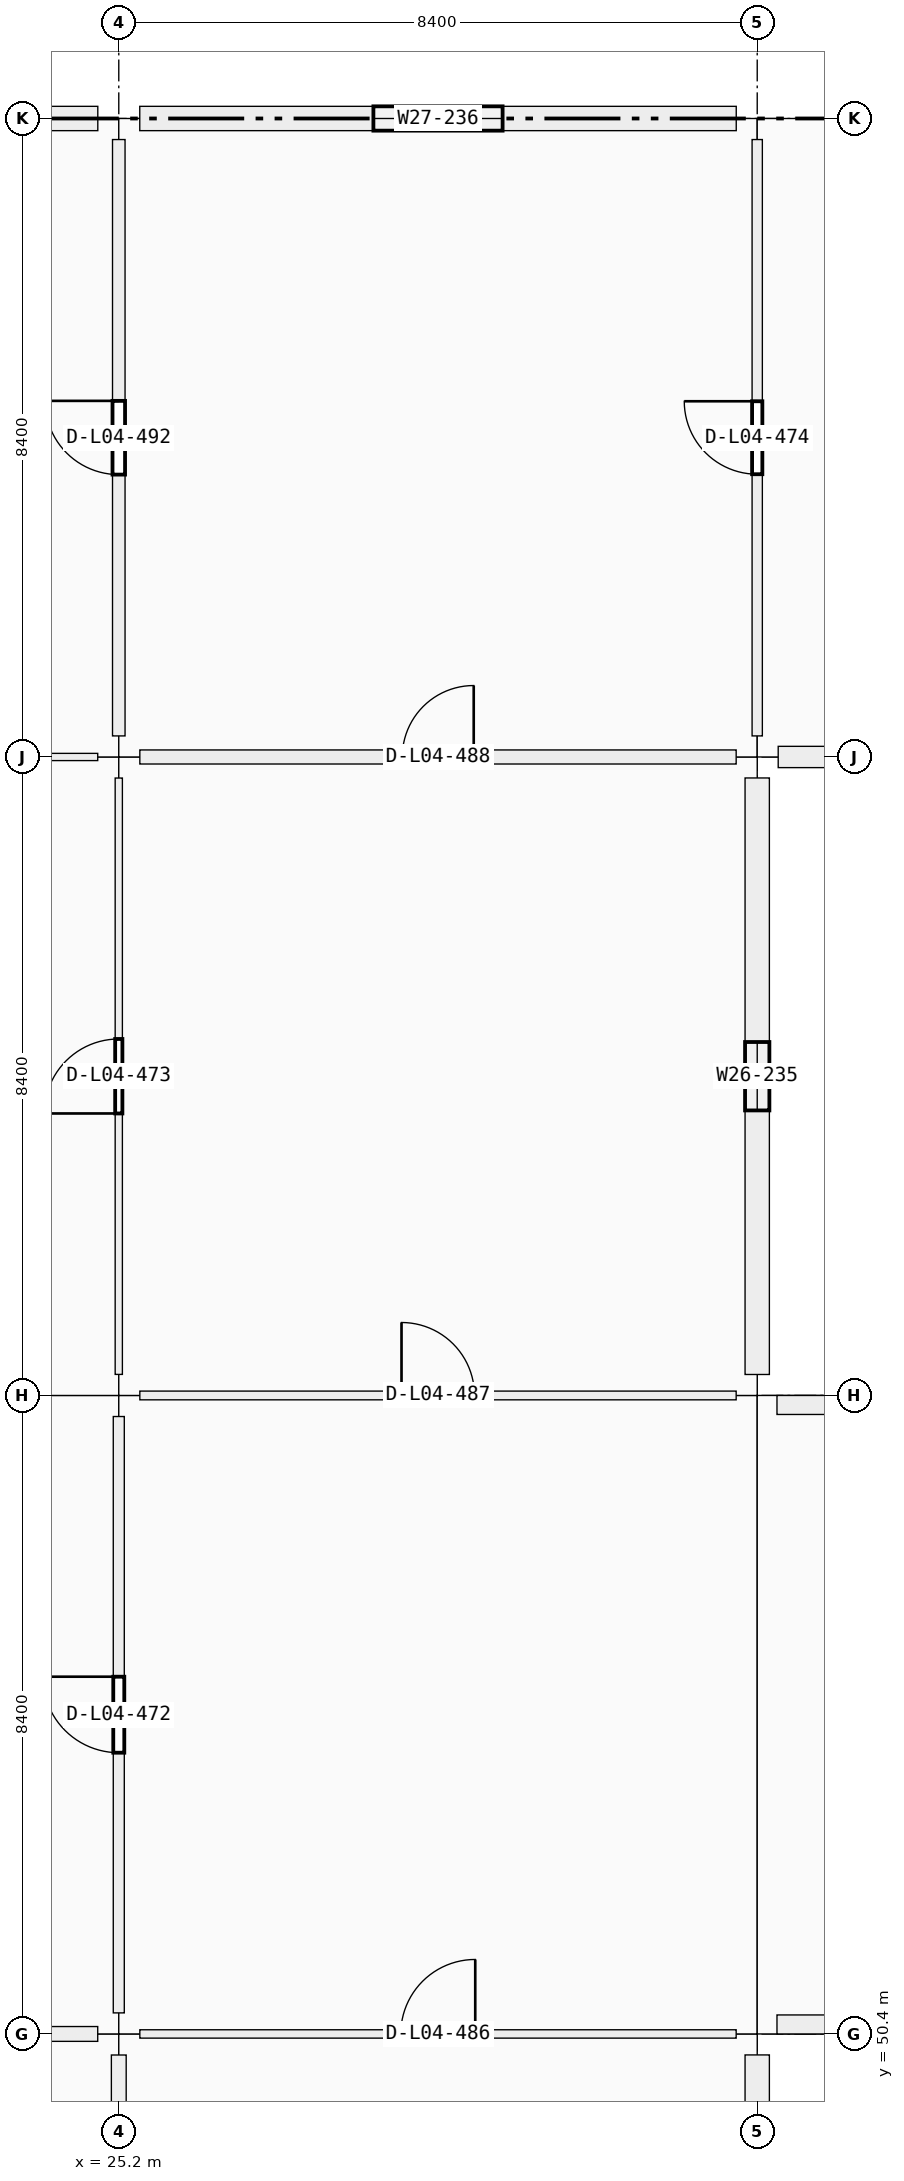
"""IFC4 building model, lengths in metres.
Left out: names, types, materials, properties, quantities, classifications, styles, units other than length and angle.
Written with IfcOpenShell. Run it as: python <this file> out.ifc"""

import sys

from ifc_helpers import new_model, si_unit, direction, frame, frame_2d, origin, origin_2d, place, context, subcontext, project, spatial, rectangle, i_section, extrude, element, fill, save


model = new_model("IFC4")
c1 = context("Model", 3, precision=1e-05, world=origin(), true_north=direction((0.0, 1.0)))
c2 = subcontext(c1, "Body", "Model", "MODEL_VIEW")
j1 = project(units=[si_unit("LENGTHUNIT", "METRE"), si_unit("PLANEANGLEUNIT", "RADIAN")], contexts=[c1])
p1 = place(None, origin())
s1 = spatial("IfcSite", under=j1, at=p1, CompositionType="ELEMENT")
p2 = place(p1, origin())
s2 = spatial("IfcBuilding", under=s1, at=p2, CompositionType="ELEMENT")
p3 = place(p2, frame((0.0, 0.0, 19.08)))
s3 = spatial("IfcBuildingStorey", under=s2, at=p3, CompositionType="ELEMENT", Elevation=19.08)
for number, where, z_axis, x_axis in (
    (1, (25.2, 50.4, 0.0), (0.0, 0.0, 1.0), (1.0, 0.0, 0.0)),
    (2, (25.2, 58.8, 0.0), (0.0, 0.0, 1.0), (1.0, 0.0, 0.0)),
    (3, (25.2, 67.2, 0.0), (0.0, 0.0, 1.0), (1.0, 0.0, 0.0)),
    (4, (25.2, 75.6, 0.0), (0.0, 0.0, 1.0), (1.0, 0.0, 0.0)),
    (5, (33.6, 50.4, 0.0), (0.0, 0.0, 1.0), (1.0, 0.0, 0.0)),
    (6, (33.6, 58.8, 0.0), (0.0, 0.0, 1.0), (1.0, 0.0, 0.0)),
    (7, (33.6, 67.2, 0.0), (0.0, 0.0, 1.0), (1.0, 0.0, 0.0)),
    (8, (33.6, 75.6, 0.0), (0.0, 0.0, 1.0), (1.0, 0.0, 0.0)),
):
    element("IfcColumn", number, at=place(p3, frame(where, z_axis=z_axis, x_axis=x_axis)), inside=s3, PredefinedType="COLUMN", context=c2, shape_type="SweptSolid", body=[
        extrude(rectangle(XDim=0.55, YDim=0.55, at=origin_2d()), origin(), (0.0, 0.0, 1.0), 4.16),
    ])
for number, where, z_axis, x_axis in (
    (9, (25.2, 50.4, 4.16), (0.0, 0.0, 1.0), (1.0, 0.0, 0.0)),
    (10, (25.2, 58.8, 4.16), (0.0, 0.0, 1.0), (1.0, 0.0, 0.0)),
    (11, (25.2, 67.2, 4.16), (0.0, 0.0, 1.0), (1.0, 0.0, 0.0)),
    (12, (25.2, 75.6, 4.16), (0.0, 0.0, 1.0), (1.0, 0.0, 0.0)),
):
    element("IfcColumn", number, at=place(p3, frame(where, z_axis=z_axis, x_axis=x_axis)), inside=s3, PredefinedType="COLUMN", context=c2, shape_type="SweptSolid", body=[
        extrude(i_section(OverallWidth=0.305, OverallDepth=0.308, WebThickness=0.01, FlangeThickness=0.015, FilletRadius=0.017, at=origin_2d()), origin(), (0.0, 0.0, 1.0), 1.925),
    ])
p4 = place(p3, frame((17.076, 75.6, 0.0), z_axis=(0.0, 0.0, 1.0), x_axis=(1.0, 0.0, 0.0)))
e13 = element("IfcWall", 13, at=p4, inside=s3, PredefinedType="SOLIDWALL", context=c2, shape_type="SweptSolid", body=[
    extrude(rectangle(XDim=7.848, YDim=0.32, at=frame_2d((3.924, 0.0))), origin(), (0.0, 0.0, 1.0), 3.37),
])
p5 = place(p3, frame((33.6, 50.124, 0.0), z_axis=(0.0, 0.0, 1.0), x_axis=(0.0, -1.0, 0.0)))
e14 = element("IfcWall", 14, at=p5, inside=s3, PredefinedType="SOLIDWALL", context=c2, shape_type="SweptSolid", body=[
    extrude(rectangle(XDim=7.848, YDim=0.32, at=frame_2d((3.924, 0.0))), origin(), (0.0, 0.0, 1.0), 3.37),
])
p6 = place(p5, frame((3.174, 0.0, 0.9)))
e15 = element("IfcOpeningElement", 15, at=p6, cuts=e14, PredefinedType="OPENING", context=c2, shape_type="SweptSolid", body=[
    extrude(rectangle(XDim=1.5, YDim=1.2, at=frame_2d((0.75, 0.6))), frame((0.0, 0.16, 0.0), z_axis=(0.0, -1.0, 0.0), x_axis=(1.0, 0.0, 0.0)), (0.0, 0.0, 1.0), 0.32),
])
p7 = place(p3, frame((33.6, 66.924, 0.0), z_axis=(0.0, 0.0, 1.0), x_axis=(0.0, -1.0, 0.0)))
e16 = element("IfcWall", 16, at=p7, inside=s3, PredefinedType="SOLIDWALL", context=c2, shape_type="SweptSolid", body=[
    extrude(rectangle(XDim=7.848, YDim=0.32, at=frame_2d((3.924, 0.0))), origin(), (0.0, 0.0, 1.0), 3.37),
])
p8 = place(p7, frame((3.474, 0.0, 0.9)))
e17 = element("IfcOpeningElement", 17, at=p8, cuts=e16, PredefinedType="OPENING", context=c2, shape_type="SweptSolid", body=[
    extrude(rectangle(XDim=0.9, YDim=1.5, at=frame_2d((0.45, 0.75))), frame((0.0, 0.16, 0.0), z_axis=(0.0, -1.0, 0.0), x_axis=(1.0, 0.0, 0.0)), (0.0, 0.0, 1.0), 0.32),
])
p9 = place(p3, frame((25.476, 75.6, 0.0), z_axis=(0.0, 0.0, 1.0), x_axis=(1.0, 0.0, 0.0)))
e18 = element("IfcWall", 18, at=p9, inside=s3, PredefinedType="SOLIDWALL", context=c2, shape_type="SweptSolid", body=[
    extrude(rectangle(XDim=7.848, YDim=0.32, at=frame_2d((3.924, 0.0))), origin(), (0.0, 0.0, 1.0), 3.37),
])
p10 = place(p9, frame((3.074, 0.0, 0.9)))
e19 = element("IfcOpeningElement", 19, at=p10, cuts=e18, PredefinedType="OPENING", context=c2, shape_type="SweptSolid", body=[
    extrude(rectangle(XDim=1.7, YDim=1.85, at=frame_2d((0.85, 0.925))), frame((0.0, 0.16, 0.0), z_axis=(0.0, -1.0, 0.0), x_axis=(1.0, 0.0, 0.0)), (0.0, 0.0, 1.0), 0.32),
])
p11 = place(p3, frame((41.724, 67.2, 0.0), z_axis=(0.0, 0.0, 1.0), x_axis=(-1.0, 0.0, 0.0)))
e20 = element("IfcWall", 20, at=p11, inside=s3, PredefinedType="SOLIDWALL", context=c2, shape_type="SweptSolid", body=[
    extrude(rectangle(XDim=7.848, YDim=0.28, at=frame_2d((3.924, 0.0))), origin(), (0.0, 0.0, 1.0), 3.37),
])
p12 = place(p11, frame((2.774, 0.0, 0.9)))
e21 = element("IfcOpeningElement", 21, at=p12, cuts=e20, PredefinedType="OPENING", context=c2, shape_type="SweptSolid", body=[
    extrude(rectangle(XDim=2.3, YDim=1.85, at=frame_2d((1.15, 0.925))), frame((0.0, 0.14, 0.0), z_axis=(0.0, -1.0, 0.0), x_axis=(1.0, 0.0, 0.0)), (0.0, 0.0, 1.0), 0.28),
])
for number, where, z_axis, x_axis in (
    (22, (41.74, 50.525, 0.0), (0.0, 0.0, 1.0), (-1.0, 0.0, 0.0)),
    (23, (33.86, 58.675, 0.0), (0.0, 0.0, 1.0), (1.0, 0.0, 0.0)),
):
    element("IfcWall", number, at=place(p3, frame(where, z_axis=z_axis, x_axis=x_axis)), inside=s3, PredefinedType="PARAPET", context=c2, shape_type="SweptSolid", body=[
        extrude(rectangle(XDim=7.88, YDim=0.25, at=frame_2d((3.94, 0.0))), origin(), (0.0, 0.0, 1.0), 0.95),
    ])
p13 = place(p3, frame((17.077, 50.4, 0.0), z_axis=(0.0, 0.0, 1.0), x_axis=(1.0, 0.0, 0.0)))
e24 = element("IfcWall", 24, at=p13, inside=s3, PredefinedType="PARTITIONING", context=c2, shape_type="SweptSolid", body=[
    extrude(rectangle(XDim=7.846, YDim=0.195, at=frame_2d((3.923, 0.0))), origin(), (0.0, 0.0, 1.0), 3.19),
])
p14 = place(p13, frame((0.718, 0.0, 0.0)))
e25 = element("IfcOpeningElement", 25, at=p14, cuts=e24, PredefinedType="OPENING", context=c2, shape_type="SweptSolid", body=[
    extrude(rectangle(XDim=0.94, YDim=2.08, at=frame_2d((0.47, 1.04))), frame((0.0, 0.098, 0.0), z_axis=(0.0, -1.0, 0.0), x_axis=(1.0, 0.0, 0.0)), (0.0, 0.0, 1.0), 0.195),
])
p15 = place(p13, frame((4.628, 0.0, 0.0)))
e26 = element("IfcOpeningElement", 26, at=p15, cuts=e24, PredefinedType="OPENING", context=c2, shape_type="SweptSolid", body=[
    extrude(rectangle(XDim=0.96, YDim=2.1, at=frame_2d((0.48, 1.05))), frame((0.0, 0.098, 0.0), z_axis=(0.0, -1.0, 0.0), x_axis=(1.0, 0.0, 0.0)), (0.0, 0.0, 1.0), 0.195),
])
p16 = place(p3, frame((17.077, 67.2, 0.0), z_axis=(0.0, 0.0, 1.0), x_axis=(1.0, 0.0, 0.0)))
e27 = element("IfcWall", 27, at=p16, inside=s3, PredefinedType="PARTITIONING", context=c2, shape_type="SweptSolid", body=[
    extrude(rectangle(XDim=7.846, YDim=0.095, at=frame_2d((3.923, 0.0))), origin(), (0.0, 0.0, 1.0), 3.19),
])
p17 = place(p16, frame((3.458, 0.0, 0.0)))
e28 = element("IfcOpeningElement", 28, at=p17, cuts=e27, PredefinedType="OPENING", context=c2, shape_type="SweptSolid", body=[
    extrude(rectangle(XDim=0.93, YDim=2.12, at=frame_2d((0.465, 1.06))), frame((0.0, 0.047, 0.0), z_axis=(0.0, -1.0, 0.0), x_axis=(1.0, 0.0, 0.0)), (0.0, 0.0, 1.0), 0.095),
])
p18 = place(p3, frame((25.477, 50.4, 0.0), z_axis=(0.0, 0.0, 1.0), x_axis=(1.0, 0.0, 0.0)))
e29 = element("IfcWall", 29, at=p18, inside=s3, PredefinedType="MOVABLE", context=c2, shape_type="SweptSolid", body=[
    extrude(rectangle(XDim=7.846, YDim=0.11, at=frame_2d((3.923, 0.0))), origin(), (0.0, 0.0, 1.0), 3.19),
])
p19 = place(p18, frame((3.433, 0.0, 0.0)))
e30 = element("IfcOpeningElement", 30, at=p19, cuts=e29, PredefinedType="OPENING", context=c2, shape_type="SweptSolid", body=[
    extrude(rectangle(XDim=0.98, YDim=2.18, at=frame_2d((0.49, 1.09))), frame((0.0, 0.055, 0.0), z_axis=(0.0, -1.0, 0.0), x_axis=(1.0, 0.0, 0.0)), (0.0, 0.0, 1.0), 0.11),
])
p20 = place(p3, frame((25.477, 58.8, 0.0), z_axis=(0.0, 0.0, 1.0), x_axis=(1.0, 0.0, 0.0)))
e31 = element("IfcWall", 31, at=p20, inside=s3, PredefinedType="PARTITIONING", context=c2, shape_type="SweptSolid", body=[
    extrude(rectangle(XDim=7.846, YDim=0.115, at=frame_2d((3.923, 0.0))), origin(), (0.0, 0.0, 1.0), 3.19),
])
p21 = place(p20, frame((3.443, 0.0, 0.0)))
e32 = element("IfcOpeningElement", 32, at=p21, cuts=e31, PredefinedType="OPENING", context=c2, shape_type="SweptSolid", body=[
    extrude(rectangle(XDim=0.96, YDim=2.18, at=frame_2d((0.48, 1.09))), frame((0.0, 0.058, 0.0), z_axis=(0.0, -1.0, 0.0), x_axis=(1.0, 0.0, 0.0)), (0.0, 0.0, 1.0), 0.115),
])
p22 = place(p3, frame((25.477, 67.2, 0.0), z_axis=(0.0, 0.0, 1.0), x_axis=(1.0, 0.0, 0.0)))
e33 = element("IfcWall", 33, at=p22, inside=s3, PredefinedType="PARTITIONING", context=c2, shape_type="SweptSolid", body=[
    extrude(rectangle(XDim=7.846, YDim=0.185, at=frame_2d((3.923, 0.0))), origin(), (0.0, 0.0, 1.0), 3.19),
])
p23 = place(p22, frame((3.453, 0.0, 0.0)))
e34 = element("IfcOpeningElement", 34, at=p23, cuts=e33, PredefinedType="OPENING", context=c2, shape_type="SweptSolid", body=[
    extrude(rectangle(XDim=0.94, YDim=2.15, at=frame_2d((0.47, 1.075))), frame((0.0, 0.093, 0.0), z_axis=(0.0, -1.0, 0.0), x_axis=(1.0, 0.0, 0.0)), (0.0, 0.0, 1.0), 0.185),
])
p24 = place(p3, frame((25.2, 42.277, 0.0), z_axis=(0.0, 0.0, 1.0), x_axis=(0.0, 1.0, 0.0)))
e35 = element("IfcWall", 35, at=p24, inside=s3, PredefinedType="PARTITIONING", context=c2, shape_type="SweptSolid", body=[
    extrude(rectangle(XDim=7.846, YDim=0.195, at=frame_2d((3.923, 0.0))), origin(), (0.0, 0.0, 1.0), 3.19),
])
p25 = place(p3, frame((25.2, 50.677, 0.0), z_axis=(0.0, 0.0, 1.0), x_axis=(0.0, 1.0, 0.0)))
e36 = element("IfcWall", 36, at=p25, inside=s3, PredefinedType="PARTITIONING", context=c2, shape_type="SweptSolid", body=[
    extrude(rectangle(XDim=7.846, YDim=0.145, at=frame_2d((3.923, 0.0))), origin(), (0.0, 0.0, 1.0), 3.19),
])
p26 = place(p25, frame((3.423, 0.0, 0.0)))
e37 = element("IfcOpeningElement", 37, at=p26, cuts=e36, PredefinedType="OPENING", context=c2, shape_type="SweptSolid", body=[
    extrude(rectangle(XDim=1.0, YDim=2.2, at=frame_2d((0.5, 1.1))), frame((0.0, 0.073, 0.0), z_axis=(0.0, -1.0, 0.0), x_axis=(1.0, 0.0, 0.0)), (0.0, 0.0, 1.0), 0.145),
])
p27 = place(p3, frame((25.2, 59.077, 0.0), z_axis=(0.0, 0.0, 1.0), x_axis=(0.0, 1.0, 0.0)))
e38 = element("IfcWall", 38, at=p27, inside=s3, PredefinedType="PARTITIONING", context=c2, shape_type="SweptSolid", body=[
    extrude(rectangle(XDim=7.846, YDim=0.095, at=frame_2d((3.923, 0.0))), origin(), (0.0, 0.0, 1.0), 3.19),
])
p28 = place(p27, frame((3.433, 0.0, 0.0)))
e39 = element("IfcOpeningElement", 39, at=p28, cuts=e38, PredefinedType="OPENING", context=c2, shape_type="SweptSolid", body=[
    extrude(rectangle(XDim=0.98, YDim=2.18, at=frame_2d((0.49, 1.09))), frame((0.0, 0.047, 0.0), z_axis=(0.0, -1.0, 0.0), x_axis=(1.0, 0.0, 0.0)), (0.0, 0.0, 1.0), 0.095),
])
p29 = place(p3, frame((25.2, 67.477, 0.0), z_axis=(0.0, 0.0, 1.0), x_axis=(0.0, 1.0, 0.0)))
e40 = element("IfcWall", 40, at=p29, inside=s3, PredefinedType="PARTITIONING", context=c2, shape_type="SweptSolid", body=[
    extrude(rectangle(XDim=7.846, YDim=0.165, at=frame_2d((3.923, 0.0))), origin(), (0.0, 0.0, 1.0), 3.19),
])
p30 = place(p29, frame((3.438, 0.0, 0.0)))
e41 = element("IfcOpeningElement", 41, at=p30, cuts=e40, PredefinedType="OPENING", context=c2, shape_type="SweptSolid", body=[
    extrude(rectangle(XDim=0.97, YDim=2.12, at=frame_2d((0.485, 1.06))), frame((0.0, 0.083, 0.0), z_axis=(0.0, -1.0, 0.0), x_axis=(1.0, 0.0, 0.0)), (0.0, 0.0, 1.0), 0.165),
])
p31 = place(p3, frame((33.6, 67.477, 0.0), z_axis=(0.0, 0.0, 1.0), x_axis=(0.0, 1.0, 0.0)))
e42 = element("IfcWall", 42, at=p31, inside=s3, PredefinedType="PARTITIONING", context=c2, shape_type="SweptSolid", body=[
    extrude(rectangle(XDim=7.846, YDim=0.135, at=frame_2d((3.923, 0.0))), origin(), (0.0, 0.0, 1.0), 3.19),
])
p32 = place(p31, frame((3.443, 0.0, 0.0)))
e43 = element("IfcOpeningElement", 43, at=p32, cuts=e42, PredefinedType="OPENING", context=c2, shape_type="SweptSolid", body=[
    extrude(rectangle(XDim=0.96, YDim=2.18, at=frame_2d((0.48, 1.09))), frame((0.0, 0.067, 0.0), z_axis=(0.0, -1.0, 0.0), x_axis=(1.0, 0.0, 0.0)), (0.0, 0.0, 1.0), 0.135),
])
p33 = place(p8, origin())
e44 = element("IfcWindow", 44, at=p33, inside=s3, PartitioningType="SINGLE_PANEL", PredefinedType="WINDOW", context=c2, shape_type="SweptSolid", body=[
    extrude(rectangle(XDim=0.9, YDim=1.5, at=frame_2d((0.45, 0.75))), frame((0.0, 0.03, 0.0), z_axis=(0.0, -1.0, 0.0), x_axis=(1.0, 0.0, 0.0)), (0.0, 0.0, 1.0), 0.06),
])
fill(e17, e44)
p34 = place(p10, origin())
e45 = element("IfcWindow", 45, at=p34, inside=s3, PartitioningType="SINGLE_PANEL", PredefinedType="WINDOW", context=c2, shape_type="SweptSolid", body=[
    extrude(rectangle(XDim=1.7, YDim=1.85, at=frame_2d((0.85, 0.925))), frame((0.0, 0.03, 0.0), z_axis=(0.0, -1.0, 0.0), x_axis=(1.0, 0.0, 0.0)), (0.0, 0.0, 1.0), 0.06),
])
fill(e19, e45)
p35 = place(p26, origin())
e46 = element("IfcDoor", 46, at=p35, inside=s3, OperationType="SINGLE_SWING_RIGHT", PredefinedType="DOOR", context=c2, shape_type="SweptSolid", body=[
    extrude(rectangle(XDim=1.0, YDim=2.2, at=frame_2d((0.5, 1.1))), frame((0.0, 0.025, 0.0), z_axis=(0.0, -1.0, 0.0), x_axis=(1.0, 0.0, 0.0)), (0.0, 0.0, 1.0), 0.05),
])
fill(e37, e46)
p36 = place(p28, origin())
e47 = element("IfcDoor", 47, at=p36, inside=s3, OperationType="SINGLE_SWING_LEFT", PredefinedType="DOOR", context=c2, shape_type="SweptSolid", body=[
    extrude(rectangle(XDim=0.98, YDim=2.18, at=frame_2d((0.49, 1.09))), frame((0.0, 0.025, 0.0), z_axis=(0.0, -1.0, 0.0), x_axis=(1.0, 0.0, 0.0)), (0.0, 0.0, 1.0), 0.05),
])
fill(e39, e47)
p37 = place(p32, origin())
e48 = element("IfcDoor", 48, at=p37, inside=s3, OperationType="SINGLE_SWING_RIGHT", PredefinedType="DOOR", context=c2, shape_type="SweptSolid", body=[
    extrude(rectangle(XDim=0.96, YDim=2.18, at=frame_2d((0.48, 1.09))), frame((0.0, 0.025, 0.0), z_axis=(0.0, -1.0, 0.0), x_axis=(1.0, 0.0, 0.0)), (0.0, 0.0, 1.0), 0.05),
])
fill(e43, e48)
p38 = place(p19, origin())
e49 = element("IfcDoor", 49, at=p38, inside=s3, OperationType="SINGLE_SWING_RIGHT", PredefinedType="DOOR", context=c2, shape_type="SweptSolid", body=[
    extrude(rectangle(XDim=0.98, YDim=2.18, at=frame_2d((0.49, 1.09))), frame((0.0, 0.025, 0.0), z_axis=(0.0, -1.0, 0.0), x_axis=(1.0, 0.0, 0.0)), (0.0, 0.0, 1.0), 0.05),
])
fill(e30, e49)
p39 = place(p21, origin())
e50 = element("IfcDoor", 50, at=p39, inside=s3, OperationType="SINGLE_SWING_LEFT", PredefinedType="DOOR", context=c2, shape_type="SweptSolid", body=[
    extrude(rectangle(XDim=0.96, YDim=2.18, at=frame_2d((0.48, 1.09))), frame((0.0, 0.025, 0.0), z_axis=(0.0, -1.0, 0.0), x_axis=(1.0, 0.0, 0.0)), (0.0, 0.0, 1.0), 0.05),
])
fill(e32, e50)
p40 = place(p23, origin())
e51 = element("IfcDoor", 51, at=p40, inside=s3, OperationType="SINGLE_SWING_RIGHT", PredefinedType="DOOR", context=c2, shape_type="SweptSolid", body=[
    extrude(rectangle(XDim=0.94, YDim=2.15, at=frame_2d((0.47, 1.075))), frame((0.0, 0.025, 0.0), z_axis=(0.0, -1.0, 0.0), x_axis=(1.0, 0.0, 0.0)), (0.0, 0.0, 1.0), 0.05),
])
fill(e34, e51)
p41 = place(p30, origin())
e52 = element("IfcDoor", 52, at=p41, inside=s3, OperationType="SINGLE_SWING_RIGHT", PredefinedType="DOOR", context=c2, shape_type="SweptSolid", body=[
    extrude(rectangle(XDim=0.97, YDim=2.12, at=frame_2d((0.485, 1.06))), frame((0.0, 0.025, 0.0), z_axis=(0.0, -1.0, 0.0), x_axis=(1.0, 0.0, 0.0)), (0.0, 0.0, 1.0), 0.05),
])
fill(e41, e52)
save(model, sys.argv[1])
